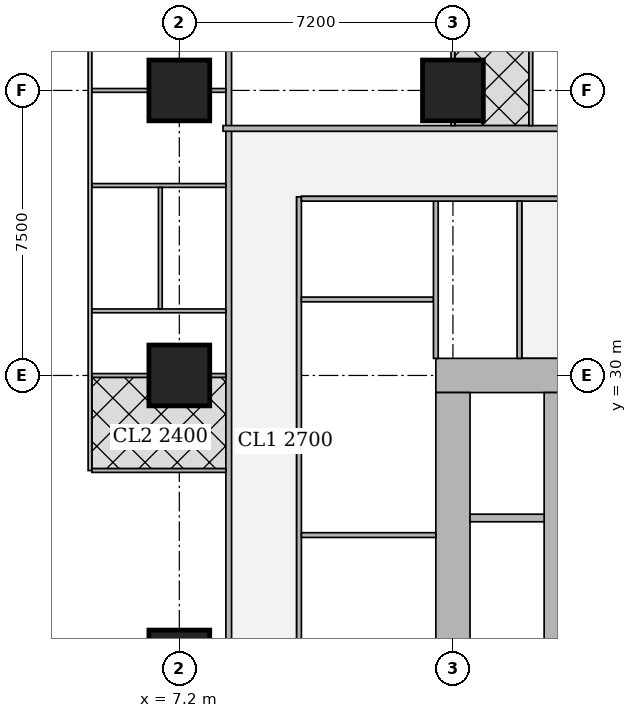
"""IFC4 building model, lengths in metres.
Left out: names, types, materials, properties, quantities, classifications, styles, units other than length and angle.
Written with IfcOpenShell. Run it as: python <this file> out.ifc"""

import sys

from ifc_helpers import new_model, si_unit, direction, frame, frame_2d, origin, origin_2d, place, context, subcontext, project, spatial, rectangle, extrude, element, fill, save


model = new_model("IFC4")
c1 = context("Model", 3, precision=1e-05, world=origin(), true_north=direction((0.0, 1.0)))
c2 = subcontext(c1, "Body", "Model", "MODEL_VIEW")
j1 = project(units=[si_unit("LENGTHUNIT", "METRE"), si_unit("PLANEANGLEUNIT", "RADIAN")], contexts=[c1])
p1 = place(None, origin())
s1 = spatial("IfcSite", under=j1, at=p1, CompositionType="ELEMENT")
p2 = place(p1, origin())
s2 = spatial("IfcBuilding", under=s1, at=p2, CompositionType="ELEMENT")
p3 = place(p2, frame((0.0, 0.0, 111.65)))
s3 = spatial("IfcBuildingStorey", under=s2, at=p3, CompositionType="ELEMENT", Elevation=111.65)
for number, where, z_axis, x_axis in (
    (1, (7.2, 22.5, 0.0), (0.0, 0.0, 1.0), (1.0, 0.0, 0.0)),
    (2, (7.2, 30.0, 0.0), (0.0, 0.0, 1.0), (1.0, 0.0, 0.0)),
    (3, (7.2, 37.5, 0.0), (0.0, 0.0, 1.0), (1.0, 0.0, 0.0)),
    (4, (14.4, 37.5, 0.0), (0.0, 0.0, 1.0), (1.0, 0.0, 0.0)),
):
    element("IfcColumn", number, at=place(p3, frame(where, z_axis=z_axis, x_axis=x_axis)), inside=s3, PredefinedType="COLUMN", context=c2, shape_type="SweptSolid", body=[
        extrude(rectangle(XDim=1.6, YDim=1.6, at=origin_2d()), origin(), (0.0, 0.0, 1.0), 3.75),
    ])
p4 = place(p3, frame((13.95, 30.0, 0.0), z_axis=(0.0, 0.0, 1.0), x_axis=(1.0, 0.0, 0.0)))
e5 = element("IfcWall", 5, at=p4, inside=s3, PredefinedType="SHEAR", context=c2, shape_type="SweptSolid", body=[
    extrude(rectangle(XDim=15.3, YDim=0.9, at=frame_2d((7.65, 0.0))), origin(), (0.0, 0.0, 1.0), 3.75),
])
p5 = place(p4, frame((4.45, 0.0, 0.0)))
e6 = element("IfcOpeningElement", 6, at=p5, cuts=e5, PredefinedType="OPENING", context=c2, shape_type="SweptSolid", body=[
    extrude(rectangle(XDim=1.8, YDim=2.1, at=frame_2d((0.9, 1.05))), frame((0.0, 0.46, 0.0), z_axis=(0.0, -1.0, 0.0), x_axis=(1.0, 0.0, 0.0)), (0.0, 0.0, 1.0), 0.92),
])
p6 = place(p4, frame((10.7, 0.0, 0.0)))
e7 = element("IfcOpeningElement", 7, at=p6, cuts=e5, PredefinedType="OPENING", context=c2, shape_type="SweptSolid", body=[
    extrude(rectangle(XDim=1.1, YDim=2.1, at=frame_2d((0.55, 1.05))), frame((0.0, 0.46, 0.0), z_axis=(0.0, -1.0, 0.0), x_axis=(1.0, 0.0, 0.0)), (0.0, 0.0, 1.0), 0.92),
])
p7 = place(p3, frame((14.4, 15.45, 0.0), z_axis=(0.0, 0.0, 1.0), x_axis=(0.0, 1.0, 0.0)))
e8 = element("IfcWall", 8, at=p7, inside=s3, PredefinedType="SHEAR", context=c2, shape_type="SweptSolid", body=[
    extrude(rectangle(XDim=14.1, YDim=0.9, at=frame_2d((7.05, 0.0))), origin(), (0.0, 0.0, 1.0), 3.75),
])
p8 = place(p3, frame((17.0, 15.45, 0.0), z_axis=(0.0, 0.0, 1.0), x_axis=(0.0, 1.0, 0.0)))
e9 = element("IfcWall", 9, at=p8, inside=s3, PredefinedType="SHEAR", context=c2, shape_type="SweptSolid", body=[
    extrude(rectangle(XDim=14.1, YDim=0.4, at=frame_2d((7.05, 0.0))), origin(), (0.0, 0.0, 1.0), 3.75),
])
p9 = place(p8, frame((0.875, 0.0, 0.0)))
e10 = element("IfcOpeningElement", 10, at=p9, cuts=e9, PredefinedType="OPENING", context=c2, shape_type="SweptSolid", body=[
    extrude(rectangle(XDim=1.1, YDim=2.1, at=frame_2d((0.55, 1.05))), frame((0.0, 0.21, 0.0), z_axis=(0.0, -1.0, 0.0), x_axis=(1.0, 0.0, 0.0)), (0.0, 0.0, 1.0), 0.42),
])
p10 = place(p8, frame((4.625, 0.0, 0.0)))
e11 = element("IfcOpeningElement", 11, at=p10, cuts=e9, PredefinedType="OPENING", context=c2, shape_type="SweptSolid", body=[
    extrude(rectangle(XDim=1.1, YDim=2.1, at=frame_2d((0.55, 1.05))), frame((0.0, 0.21, 0.0), z_axis=(0.0, -1.0, 0.0), x_axis=(1.0, 0.0, 0.0)), (0.0, 0.0, 1.0), 0.42),
])
p11 = place(p8, frame((8.375, 0.0, 0.0)))
e12 = element("IfcOpeningElement", 12, at=p11, cuts=e9, PredefinedType="OPENING", context=c2, shape_type="SweptSolid", body=[
    extrude(rectangle(XDim=1.1, YDim=2.1, at=frame_2d((0.55, 1.05))), frame((0.0, 0.21, 0.0), z_axis=(0.0, -1.0, 0.0), x_axis=(1.0, 0.0, 0.0)), (0.0, 0.0, 1.0), 0.42),
])
p12 = place(p8, frame((12.125, 0.0, 0.0)))
e13 = element("IfcOpeningElement", 13, at=p12, cuts=e9, PredefinedType="OPENING", context=c2, shape_type="SweptSolid", body=[
    extrude(rectangle(XDim=1.1, YDim=2.1, at=frame_2d((0.55, 1.05))), frame((0.0, 0.21, 0.0), z_axis=(0.0, -1.0, 0.0), x_axis=(1.0, 0.0, 0.0)), (0.0, 0.0, 1.0), 0.42),
])
p13 = place(p3, frame((8.5, -0.65, 0.0), z_axis=(0.0, 0.0, 1.0), x_axis=(0.0, 1.0, 0.0)))
e14 = element("IfcWall", 14, at=p13, inside=s3, PredefinedType="SOLIDWALL", context=c2, shape_type="SweptSolid", body=[
    extrude(rectangle(XDim=46.3, YDim=0.15, at=frame_2d((23.15, 0.0))), origin(), (0.0, 0.0, 1.0), 2.2),
])
p14 = place(p13, frame((9.525, 0.0, 0.0)))
e15 = element("IfcOpeningElement", 15, at=p14, cuts=e14, PredefinedType="OPENING", context=c2, shape_type="SweptSolid", body=[
    extrude(rectangle(XDim=1.0, YDim=2.1, at=frame_2d((0.5, 1.05))), frame((0.0, 0.085, 0.0), z_axis=(0.0, -1.0, 0.0), x_axis=(1.0, 0.0, 0.0)), (0.0, 0.0, 1.0), 0.17),
])
p15 = place(p13, frame((13.275, 0.0, 0.0)))
e16 = element("IfcOpeningElement", 16, at=p15, cuts=e14, PredefinedType="OPENING", context=c2, shape_type="SweptSolid", body=[
    extrude(rectangle(XDim=1.0, YDim=2.1, at=frame_2d((0.5, 1.05))), frame((0.0, 0.085, 0.0), z_axis=(0.0, -1.0, 0.0), x_axis=(1.0, 0.0, 0.0)), (0.0, 0.0, 1.0), 0.17),
])
p16 = place(p13, frame((25.15, 0.0, 0.0)))
e17 = element("IfcOpeningElement", 17, at=p16, cuts=e14, PredefinedType="OPENING", context=c2, shape_type="SweptSolid", body=[
    extrude(rectangle(XDim=1.0, YDim=2.1, at=frame_2d((0.5, 1.05))), frame((0.0, 0.085, 0.0), z_axis=(0.0, -1.0, 0.0), x_axis=(1.0, 0.0, 0.0)), (0.0, 0.0, 1.0), 0.17),
])
p17 = place(p3, frame((8.35, 36.5, 0.0), z_axis=(0.0, 0.0, 1.0), x_axis=(1.0, 0.0, 0.0)))
e18 = element("IfcWall", 18, at=p17, inside=s3, PredefinedType="SOLIDWALL", context=c2, shape_type="SweptSolid", body=[
    extrude(rectangle(XDim=26.415, YDim=0.15, at=frame_2d((13.208, 0.0))), origin(), (0.0, 0.0, 1.0), 3.5),
])
p18 = place(p17, frame((2.6, 0.0, 0.0)))
e19 = element("IfcOpeningElement", 19, at=p18, cuts=e18, PredefinedType="OPENING", context=c2, shape_type="SweptSolid", body=[
    extrude(rectangle(XDim=1.0, YDim=2.1, at=frame_2d((0.5, 1.05))), frame((0.0, 0.085, 0.0), z_axis=(0.0, -1.0, 0.0), x_axis=(1.0, 0.0, 0.0)), (0.0, 0.0, 1.0), 0.17),
])
p19 = place(p17, frame((10.949, 0.0, 0.0)))
e20 = element("IfcOpeningElement", 20, at=p19, cuts=e18, PredefinedType="OPENING", context=c2, shape_type="SweptSolid", body=[
    extrude(rectangle(XDim=1.0, YDim=2.1, at=frame_2d((0.5, 1.05))), frame((0.0, 0.085, 0.0), z_axis=(0.0, -1.0, 0.0), x_axis=(1.0, 0.0, 0.0)), (0.0, 0.0, 1.0), 0.17),
])
p20 = place(p17, frame((23.923, 0.0, 0.0)))
e21 = element("IfcOpeningElement", 21, at=p20, cuts=e18, PredefinedType="OPENING", context=c2, shape_type="SweptSolid", body=[
    extrude(rectangle(XDim=1.0, YDim=2.1, at=frame_2d((0.5, 1.05))), frame((0.0, 0.085, 0.0), z_axis=(0.0, -1.0, 0.0), x_axis=(1.0, 0.0, 0.0)), (0.0, 0.0, 1.0), 0.17),
])
p21 = place(p3, frame((4.85, 27.499, 0.0), z_axis=(0.0, 0.0, 1.0), x_axis=(0.0, 1.0, 0.0)))
e22 = element("IfcWall", 22, at=p21, inside=s3, PredefinedType="PARTITIONING", context=c2, shape_type="SweptSolid", body=[
    extrude(rectangle(XDim=14.7, YDim=0.1, at=frame_2d((7.35, 0.0))), origin(), (0.0, 0.0, 1.0), 3.5),
])
p22 = place(p21, frame((0.8, 0.0, 0.0)))
e23 = element("IfcOpeningElement", 23, at=p22, cuts=e22, PredefinedType="OPENING", context=c2, shape_type="SweptSolid", body=[
    extrude(rectangle(XDim=0.9, YDim=2.1, at=frame_2d((0.45, 1.05))), frame((0.0, 0.06, 0.0), z_axis=(0.0, -1.0, 0.0), x_axis=(1.0, 0.0, 0.0)), (0.0, 0.0, 1.0), 0.12),
])
p23 = place(p21, frame((2.901, 0.0, 0.0)))
e24 = element("IfcOpeningElement", 24, at=p23, cuts=e22, PredefinedType="OPENING", context=c2, shape_type="SweptSolid", body=[
    extrude(rectangle(XDim=0.9, YDim=2.1, at=frame_2d((0.45, 1.05))), frame((0.0, 0.06, 0.0), z_axis=(0.0, -1.0, 0.0), x_axis=(1.0, 0.0, 0.0)), (0.0, 0.0, 1.0), 0.12),
])
p24 = place(p21, frame((8.3, 0.0, 0.0)))
e25 = element("IfcOpeningElement", 25, at=p24, cuts=e22, PredefinedType="OPENING", context=c2, shape_type="SweptSolid", body=[
    extrude(rectangle(XDim=0.9, YDim=2.1, at=frame_2d((0.45, 1.05))), frame((0.0, 0.06, 0.0), z_axis=(0.0, -1.0, 0.0), x_axis=(1.0, 0.0, 0.0)), (0.0, 0.0, 1.0), 0.12),
])
p25 = place(p21, frame((12.05, 0.0, 0.0)))
e26 = element("IfcOpeningElement", 26, at=p25, cuts=e22, PredefinedType="OPENING", context=c2, shape_type="SweptSolid", body=[
    extrude(rectangle(XDim=0.9, YDim=2.1, at=frame_2d((0.45, 1.05))), frame((0.0, 0.06, 0.0), z_axis=(0.0, -1.0, 0.0), x_axis=(1.0, 0.0, 0.0)), (0.0, 0.0, 1.0), 0.12),
])
p26 = place(p21, frame((5.4, 0.0, 0.0)))
e27 = element("IfcOpeningElement", 27, at=p26, cuts=e22, PredefinedType="OPENING", context=c2, shape_type="SweptSolid", body=[
    extrude(rectangle(XDim=0.9, YDim=2.1, at=frame_2d((0.45, 1.05))), frame((0.0, 0.06, 0.0), z_axis=(0.0, -1.0, 0.0), x_axis=(1.0, 0.0, 0.0)), (0.0, 0.0, 1.0), 0.12),
])
p27 = place(p3, frame((4.9, 27.499, 0.0), z_axis=(0.0, 0.0, 1.0), x_axis=(1.0, 0.0, 0.0)))
e28 = element("IfcWall", 28, at=p27, inside=s3, PredefinedType="PARTITIONING", context=c2, shape_type="SweptSolid", body=[
    extrude(rectangle(XDim=3.525, YDim=0.1, at=frame_2d((1.763, 0.0))), origin(), (0.0, 0.0, 1.0), 3.5),
])
p28 = place(p3, frame((4.9, 30.0, 0.0), z_axis=(0.0, 0.0, 1.0), x_axis=(1.0, 0.0, 0.0)))
e29 = element("IfcWall", 29, at=p28, inside=s3, PredefinedType="PARTITIONING", context=c2, shape_type="SweptSolid", body=[
    extrude(rectangle(XDim=1.499, YDim=0.1, at=frame_2d((0.75, 0.0))), origin(), (0.0, 0.0, 1.0), 3.5),
])
p29 = place(p3, frame((8.001, 30.0, 0.0), z_axis=(0.0, 0.0, 1.0), x_axis=(1.0, 0.0, 0.0)))
e30 = element("IfcWall", 30, at=p29, inside=s3, PredefinedType="PARTITIONING", context=c2, shape_type="SweptSolid", body=[
    extrude(rectangle(XDim=0.424, YDim=0.1, at=frame_2d((0.212, 0.0))), origin(), (0.0, 0.0, 1.0), 3.5),
])
p30 = place(p3, frame((4.9, 34.999, 0.0), z_axis=(0.0, 0.0, 1.0), x_axis=(1.0, 0.0, 0.0)))
e31 = element("IfcWall", 31, at=p30, inside=s3, PredefinedType="PARTITIONING", context=c2, shape_type="SweptSolid", body=[
    extrude(rectangle(XDim=3.525, YDim=0.1, at=frame_2d((1.763, 0.0))), origin(), (0.0, 0.0, 1.0), 3.5),
])
p31 = place(p3, frame((4.9, 37.5, 0.0), z_axis=(0.0, 0.0, 1.0), x_axis=(1.0, 0.0, 0.0)))
e32 = element("IfcWall", 32, at=p31, inside=s3, PredefinedType="PARTITIONING", context=c2, shape_type="SweptSolid", body=[
    extrude(rectangle(XDim=1.499, YDim=0.1, at=frame_2d((0.75, 0.0))), origin(), (0.0, 0.0, 1.0), 3.5),
])
p32 = place(p3, frame((8.001, 37.5, 0.0), z_axis=(0.0, 0.0, 1.0), x_axis=(1.0, 0.0, 0.0)))
e33 = element("IfcWall", 33, at=p32, inside=s3, PredefinedType="PARTITIONING", context=c2, shape_type="SweptSolid", body=[
    extrude(rectangle(XDim=0.424, YDim=0.1, at=frame_2d((0.212, 0.0))), origin(), (0.0, 0.0, 1.0), 3.5),
])
p33 = place(p3, frame((4.9, 31.7, 0.0), z_axis=(0.0, 0.0, 1.0), x_axis=(1.0, 0.0, 0.0)))
e34 = element("IfcWall", 34, at=p33, inside=s3, PredefinedType="PARTITIONING", context=c2, shape_type="SweptSolid", body=[
    extrude(rectangle(XDim=3.525, YDim=0.1, at=frame_2d((1.763, 0.0))), origin(), (0.0, 0.0, 1.0), 3.5),
])
p34 = place(p3, frame((14.4, 36.575, 0.0), z_axis=(0.0, 0.0, 1.0), x_axis=(0.0, 1.0, 0.0)))
e35 = element("IfcWall", 35, at=p34, inside=s3, PredefinedType="PARTITIONING", context=c2, shape_type="SweptSolid", body=[
    extrude(rectangle(XDim=0.124, YDim=0.1, at=frame_2d((0.062, 0.0))), origin(), (0.0, 0.0, 1.0), 3.5),
])
p35 = place(p3, frame((14.4, 38.301, 0.0), z_axis=(0.0, 0.0, 1.0), x_axis=(0.0, 1.0, 0.0)))
e36 = element("IfcWall", 36, at=p35, inside=s3, PredefinedType="PARTITIONING", context=c2, shape_type="SweptSolid", body=[
    extrude(rectangle(XDim=1.799, YDim=0.1, at=frame_2d((0.899, 0.0))), origin(), (0.0, 0.0, 1.0), 3.5),
])
p36 = place(p3, frame((16.45, 36.575, 0.0), z_axis=(0.0, 0.0, 1.0), x_axis=(0.0, 1.0, 0.0)))
e37 = element("IfcWall", 37, at=p36, inside=s3, PredefinedType="PARTITIONING", context=c2, shape_type="SweptSolid", body=[
    extrude(rectangle(XDim=3.525, YDim=0.1, at=frame_2d((1.763, 0.0))), origin(), (0.0, 0.0, 1.0), 3.5),
])
p37 = place(p3, frame((6.7, 31.75, 0.0), z_axis=(0.0, 0.0, 1.0), x_axis=(0.0, 1.0, 0.0)))
e38 = element("IfcWall", 38, at=p37, inside=s3, PredefinedType="PARTITIONING", context=c2, shape_type="SweptSolid", body=[
    extrude(rectangle(XDim=3.199, YDim=0.1, at=frame_2d((1.6, 0.0))), origin(), (0.0, 0.0, 1.0), 3.5),
])
p38 = place(p37, frame((1.149, 0.0, 0.0)))
e39 = element("IfcOpeningElement", 39, at=p38, cuts=e38, PredefinedType="OPENING", context=c2, shape_type="SweptSolid", body=[
    extrude(rectangle(XDim=0.9, YDim=2.1, at=frame_2d((0.45, 1.05))), frame((0.0, 0.06, 0.0), z_axis=(0.0, -1.0, 0.0), x_axis=(1.0, 0.0, 0.0)), (0.0, 0.0, 1.0), 0.12),
])
p39 = place(p3, frame((10.35, 10.3, 0.0), z_axis=(0.0, 0.0, 1.0), x_axis=(0.0, 1.0, 0.0)))
e40 = element("IfcWall", 40, at=p39, inside=s3, PredefinedType="PARTITIONING", context=c2, shape_type="SweptSolid", body=[
    extrude(rectangle(XDim=24.4, YDim=0.125, at=frame_2d((12.2, 0.0))), origin(), (0.0, 0.0, 1.0), 3.5),
])
p40 = place(p39, frame((1.55, 0.0, 0.0)))
e41 = element("IfcOpeningElement", 41, at=p40, cuts=e40, PredefinedType="OPENING", context=c2, shape_type="SweptSolid", body=[
    extrude(rectangle(XDim=1.0, YDim=2.1, at=frame_2d((0.5, 1.05))), frame((0.0, 0.073, 0.0), z_axis=(0.0, -1.0, 0.0), x_axis=(1.0, 0.0, 0.0)), (0.0, 0.0, 1.0), 0.145),
])
p41 = place(p39, frame((5.1, 0.0, 0.0)))
e42 = element("IfcOpeningElement", 42, at=p41, cuts=e40, PredefinedType="OPENING", context=c2, shape_type="SweptSolid", body=[
    extrude(rectangle(XDim=1.0, YDim=2.1, at=frame_2d((0.5, 1.05))), frame((0.0, 0.073, 0.0), z_axis=(0.0, -1.0, 0.0), x_axis=(1.0, 0.0, 0.0)), (0.0, 0.0, 1.0), 0.145),
])
p42 = place(p39, frame((10.8, 0.0, 0.0)))
e43 = element("IfcOpeningElement", 43, at=p42, cuts=e40, PredefinedType="OPENING", context=c2, shape_type="SweptSolid", body=[
    extrude(rectangle(XDim=1.0, YDim=2.1, at=frame_2d((0.5, 1.05))), frame((0.0, 0.073, 0.0), z_axis=(0.0, -1.0, 0.0), x_axis=(1.0, 0.0, 0.0)), (0.0, 0.0, 1.0), 0.145),
])
p43 = place(p39, frame((18.1, 0.0, 0.0)))
e44 = element("IfcOpeningElement", 44, at=p43, cuts=e40, PredefinedType="OPENING", context=c2, shape_type="SweptSolid", body=[
    extrude(rectangle(XDim=1.0, YDim=2.1, at=frame_2d((0.5, 1.05))), frame((0.0, 0.073, 0.0), z_axis=(0.0, -1.0, 0.0), x_axis=(1.0, 0.0, 0.0)), (0.0, 0.0, 1.0), 0.145),
])
p44 = place(p39, frame((22.55, 0.0, 0.0)))
e45 = element("IfcOpeningElement", 45, at=p44, cuts=e40, PredefinedType="OPENING", context=c2, shape_type="SweptSolid", body=[
    extrude(rectangle(XDim=1.0, YDim=2.1, at=frame_2d((0.5, 1.05))), frame((0.0, 0.073, 0.0), z_axis=(0.0, -1.0, 0.0), x_axis=(1.0, 0.0, 0.0)), (0.0, 0.0, 1.0), 0.145),
])
p45 = place(p3, frame((10.413, 25.8, 0.0), z_axis=(0.0, 0.0, 1.0), x_axis=(1.0, 0.0, 0.0)))
e46 = element("IfcWall", 46, at=p45, inside=s3, PredefinedType="PARTITIONING", context=c2, shape_type="SweptSolid", body=[
    extrude(rectangle(XDim=3.537, YDim=0.125, at=frame_2d((1.769, 0.0))), origin(), (0.0, 0.0, 1.0), 3.5),
])
p46 = place(p3, frame((10.413, 32.0, 0.0), z_axis=(0.0, 0.0, 1.0), x_axis=(1.0, 0.0, 0.0)))
e47 = element("IfcWall", 47, at=p46, inside=s3, PredefinedType="PARTITIONING", context=c2, shape_type="SweptSolid", body=[
    extrude(rectangle(XDim=3.475, YDim=0.125, at=frame_2d((1.737, 0.0))), origin(), (0.0, 0.0, 1.0), 3.5),
])
p47 = place(p3, frame((13.95, 30.45, 0.0), z_axis=(0.0, 0.0, 1.0), x_axis=(0.0, 1.0, 0.0)))
e48 = element("IfcWall", 48, at=p47, inside=s3, PredefinedType="PARTITIONING", context=c2, shape_type="SweptSolid", body=[
    extrude(rectangle(XDim=4.137, YDim=0.125, at=frame_2d((2.068, 0.0))), origin(), (0.0, 0.0, 1.0), 3.5),
])
p48 = place(p3, frame((10.413, 34.65, 0.0), z_axis=(0.0, 0.0, 1.0), x_axis=(1.0, 0.0, 0.0)))
e49 = element("IfcWall", 49, at=p48, inside=s3, PredefinedType="PARTITIONING", context=c2, shape_type="SweptSolid", body=[
    extrude(rectangle(XDim=10.837, YDim=0.125, at=frame_2d((5.418, 0.0))), origin(), (0.0, 0.0, 1.0), 3.5),
])
p49 = place(p48, frame((7.487, 0.0, 0.0)))
e50 = element("IfcOpeningElement", 50, at=p49, cuts=e49, PredefinedType="OPENING", context=c2, shape_type="SweptSolid", body=[
    extrude(rectangle(XDim=1.8, YDim=2.1, at=frame_2d((0.9, 1.05))), frame((0.0, 0.073, 0.0), z_axis=(0.0, -1.0, 0.0), x_axis=(1.0, 0.0, 0.0)), (0.0, 0.0, 1.0), 0.145),
])
p50 = place(p3, frame((16.15, 30.45, 0.0), z_axis=(0.0, 0.0, 1.0), x_axis=(0.0, 1.0, 0.0)))
e51 = element("IfcWall", 51, at=p50, inside=s3, PredefinedType="PARTITIONING", context=c2, shape_type="SweptSolid", body=[
    extrude(rectangle(XDim=4.137, YDim=0.125, at=frame_2d((2.068, 0.0))), origin(), (0.0, 0.0, 1.0), 3.5),
])
p51 = place(p50, frame((1.625, 0.0, 0.0)))
e52 = element("IfcOpeningElement", 52, at=p51, cuts=e51, PredefinedType="OPENING", context=c2, shape_type="SweptSolid", body=[
    extrude(rectangle(XDim=1.0, YDim=2.1, at=frame_2d((0.5, 1.05))), frame((0.0, 0.073, 0.0), z_axis=(0.0, -1.0, 0.0), x_axis=(1.0, 0.0, 0.0)), (0.0, 0.0, 1.0), 0.145),
])
p52 = place(p3, frame((14.85, 26.25, 0.0), z_axis=(0.0, 0.0, 1.0), x_axis=(1.0, 0.0, 0.0)))
e53 = element("IfcWall", 53, at=p52, inside=s3, PredefinedType="SOLIDWALL", context=c2, shape_type="SweptSolid", body=[
    extrude(rectangle(XDim=1.95, YDim=0.2, at=frame_2d((0.975, 0.0))), origin(), (0.0, 0.0, 1.0), 3.5),
])
p53 = place(p22, origin())
e54 = element("IfcDoor", 54, at=p53, inside=s3, OperationType="SINGLE_SWING_RIGHT", PredefinedType="DOOR", context=c2, shape_type="SweptSolid", body=[
    extrude(rectangle(XDim=0.9, YDim=2.1, at=frame_2d((0.45, 1.05))), frame((0.0, 0.025, 0.0), z_axis=(0.0, -1.0, 0.0), x_axis=(1.0, 0.0, 0.0)), (0.0, 0.0, 1.0), 0.05),
])
fill(e23, e54)
p54 = place(p23, origin())
e55 = element("IfcDoor", 55, at=p54, inside=s3, OperationType="SINGLE_SWING_RIGHT", PredefinedType="DOOR", context=c2, shape_type="SweptSolid", body=[
    extrude(rectangle(XDim=0.9, YDim=2.1, at=frame_2d((0.45, 1.05))), frame((0.0, 0.025, 0.0), z_axis=(0.0, -1.0, 0.0), x_axis=(1.0, 0.0, 0.0)), (0.0, 0.0, 1.0), 0.05),
])
fill(e24, e55)
p55 = place(p24, origin())
e56 = element("IfcDoor", 56, at=p55, inside=s3, OperationType="SINGLE_SWING_RIGHT", PredefinedType="DOOR", context=c2, shape_type="SweptSolid", body=[
    extrude(rectangle(XDim=0.9, YDim=2.1, at=frame_2d((0.45, 1.05))), frame((0.0, 0.025, 0.0), z_axis=(0.0, -1.0, 0.0), x_axis=(1.0, 0.0, 0.0)), (0.0, 0.0, 1.0), 0.05),
])
fill(e25, e56)
p56 = place(p26, origin())
e57 = element("IfcDoor", 57, at=p56, inside=s3, OperationType="SINGLE_SWING_LEFT", PredefinedType="DOOR", context=c2, shape_type="SweptSolid", body=[
    extrude(rectangle(XDim=0.9, YDim=2.1, at=frame_2d((0.45, 1.05))), frame((0.0, 0.025, 0.0), z_axis=(0.0, -1.0, 0.0), x_axis=(1.0, 0.0, 0.0)), (0.0, 0.0, 1.0), 0.05),
])
fill(e27, e57)
p57 = place(p16, origin())
e58 = element("IfcDoor", 58, at=p57, inside=s3, OperationType="SINGLE_SWING_LEFT", PredefinedType="DOOR", context=c2, shape_type="SweptSolid", body=[
    extrude(rectangle(XDim=1.0, YDim=2.1, at=frame_2d((0.5, 1.05))), frame((0.0, 0.025, 0.0), z_axis=(0.0, -1.0, 0.0), x_axis=(1.0, 0.0, 0.0)), (0.0, 0.0, 1.0), 0.05),
])
fill(e17, e58)
p58 = place(p18, origin())
e59 = element("IfcDoor", 59, at=p58, inside=s3, OperationType="SINGLE_SWING_LEFT", PredefinedType="DOOR", context=c2, shape_type="SweptSolid", body=[
    extrude(rectangle(XDim=1.0, YDim=2.1, at=frame_2d((0.5, 1.05))), frame((0.0, 0.025, 0.0), z_axis=(0.0, -1.0, 0.0), x_axis=(1.0, 0.0, 0.0)), (0.0, 0.0, 1.0), 0.05),
])
fill(e19, e59)
p59 = place(p38, origin())
e60 = element("IfcDoor", 60, at=p59, inside=s3, OperationType="SINGLE_SWING_LEFT", PredefinedType="DOOR", context=c2, shape_type="SweptSolid", body=[
    extrude(rectangle(XDim=0.9, YDim=2.1, at=frame_2d((0.45, 1.05))), frame((0.0, 0.025, 0.0), z_axis=(0.0, -1.0, 0.0), x_axis=(1.0, 0.0, 0.0)), (0.0, 0.0, 1.0), 0.05),
])
fill(e39, e60)
p60 = place(p43, origin())
e61 = element("IfcDoor", 61, at=p60, inside=s3, OperationType="SINGLE_SWING_LEFT", PredefinedType="DOOR", context=c2, shape_type="SweptSolid", body=[
    extrude(rectangle(XDim=1.0, YDim=2.1, at=frame_2d((0.5, 1.05))), frame((0.0, 0.025, 0.0), z_axis=(0.0, -1.0, 0.0), x_axis=(1.0, 0.0, 0.0)), (0.0, 0.0, 1.0), 0.05),
])
fill(e44, e61)
p61 = place(p44, origin())
e62 = element("IfcDoor", 62, at=p61, inside=s3, OperationType="SINGLE_SWING_LEFT", PredefinedType="DOOR", context=c2, shape_type="SweptSolid", body=[
    extrude(rectangle(XDim=1.0, YDim=2.1, at=frame_2d((0.5, 1.05))), frame((0.0, 0.025, 0.0), z_axis=(0.0, -1.0, 0.0), x_axis=(1.0, 0.0, 0.0)), (0.0, 0.0, 1.0), 0.05),
])
fill(e45, e62)
p62 = place(p51, origin())
e63 = element("IfcDoor", 63, at=p62, inside=s3, OperationType="SINGLE_SWING_RIGHT", PredefinedType="DOOR", context=c2, shape_type="SweptSolid", body=[
    extrude(rectangle(XDim=1.0, YDim=2.1, at=frame_2d((0.5, 1.05))), frame((0.0, 0.025, 0.0), z_axis=(0.0, -1.0, 0.0), x_axis=(1.0, 0.0, 0.0)), (0.0, 0.0, 1.0), 0.05),
])
fill(e52, e63)
p63 = place(p11, origin())
e64 = element("IfcDoor", 64, at=p63, inside=s3, OperationType="DOUBLE_DOOR_SLIDING", PredefinedType="DOOR", context=c2, shape_type="SweptSolid", body=[
    extrude(rectangle(XDim=1.1, YDim=2.1, at=frame_2d((0.55, 1.05))), frame((0.0, 0.025, 0.0), z_axis=(0.0, -1.0, 0.0), x_axis=(1.0, 0.0, 0.0)), (0.0, 0.0, 1.0), 0.05),
])
fill(e12, e64)
p64 = place(p12, origin())
e65 = element("IfcDoor", 65, at=p64, inside=s3, OperationType="DOUBLE_DOOR_SLIDING", PredefinedType="DOOR", context=c2, shape_type="SweptSolid", body=[
    extrude(rectangle(XDim=1.1, YDim=2.1, at=frame_2d((0.55, 1.05))), frame((0.0, 0.025, 0.0), z_axis=(0.0, -1.0, 0.0), x_axis=(1.0, 0.0, 0.0)), (0.0, 0.0, 1.0), 0.05),
])
fill(e13, e65)
save(model, sys.argv[1])
